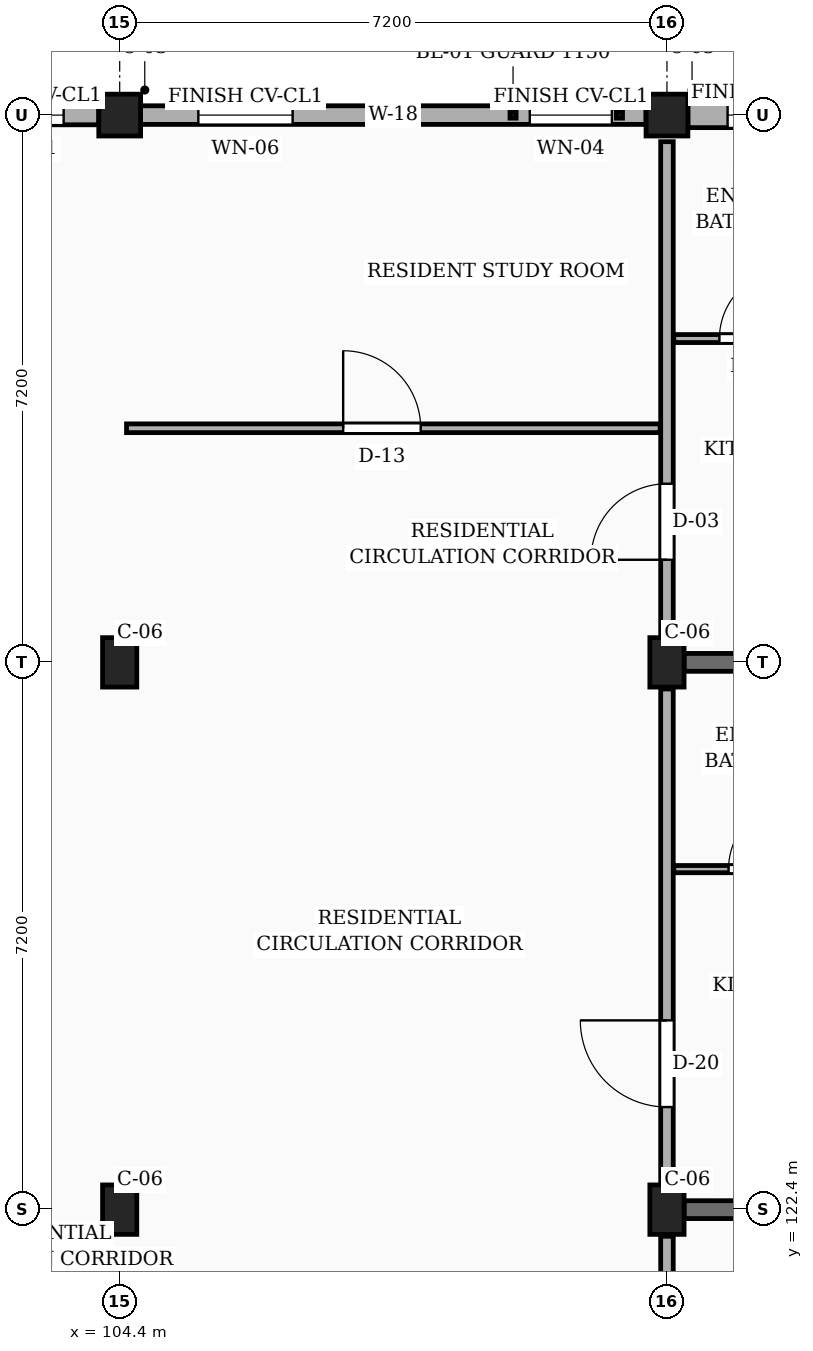
"""IFC4 building model, lengths in metres.
Left out: names, types, materials, properties, quantities, classifications, styles, units other than length and angle.
Written with IfcOpenShell. Run it as: python <this file> out.ifc"""

import sys

from ifc_helpers import new_model, si_unit, direction, frame, frame_2d, origin, origin_2d, place, context, subcontext, project, spatial, rectangle, extrude, element, fill, save


model = new_model("IFC4")
c1 = context("Model", 3, precision=1e-05, world=origin(), true_north=direction((0.0, 1.0)))
c2 = subcontext(c1, "Body", "Model", "MODEL_VIEW")
j1 = project(units=[si_unit("LENGTHUNIT", "METRE"), si_unit("PLANEANGLEUNIT", "RADIAN")], contexts=[c1])
p1 = place(None, origin())
s1 = spatial("IfcSite", under=j1, at=p1, CompositionType="ELEMENT")
p2 = place(p1, origin())
s2 = spatial("IfcBuilding", under=s1, at=p2, CompositionType="ELEMENT")
p3 = place(p2, frame((0.0, 0.0, 13.95)))
s3 = spatial("IfcBuildingStorey", under=s2, at=p3, CompositionType="ELEMENT", Elevation=13.95)
for number, where, z_axis, x_axis in (
    (1, (104.4, 122.4, 0.0), (0.0, 0.0, 1.0), (1.0, 0.0, 0.0)),
    (2, (104.4, 129.6, 0.0), (0.0, 0.0, 1.0), (1.0, 0.0, 0.0)),
):
    element("IfcColumn", number, at=place(p3, frame(where, z_axis=z_axis, x_axis=x_axis)), inside=s3, PredefinedType="COLUMN", context=c2, shape_type="SweptSolid", body=[
        extrude(rectangle(XDim=0.45, YDim=0.65, at=origin_2d()), origin(), (0.0, 0.0, 1.0), 3.15),
    ])
p4 = place(p3, frame((104.4, 136.8, 0.0), z_axis=(0.0, 0.0, 1.0), x_axis=(1.0, 0.0, 0.0)))
e3 = element("IfcColumn", 3, at=p4, inside=s3, PredefinedType="COLUMN", context=c2, shape_type="SweptSolid", body=[
    extrude(rectangle(XDim=0.55, YDim=0.55, at=origin_2d()), origin(), (0.0, 0.0, 1.0), 3.15),
])
for number, where, z_axis, x_axis in (
    (4, (111.6, 122.4, 0.0), (0.0, 0.0, 1.0), (1.0, 0.0, 0.0)),
    (5, (111.6, 129.6, 0.0), (0.0, 0.0, 1.0), (1.0, 0.0, 0.0)),
):
    element("IfcColumn", number, at=place(p3, frame(where, z_axis=z_axis, x_axis=x_axis)), inside=s3, PredefinedType="COLUMN", context=c2, shape_type="SweptSolid", body=[
        extrude(rectangle(XDim=0.45, YDim=0.65, at=origin_2d()), origin(), (0.0, 0.0, 1.0), 3.15),
    ])
p5 = place(p3, frame((111.6, 136.8, 0.0), z_axis=(0.0, 0.0, 1.0), x_axis=(1.0, 0.0, 0.0)))
e6 = element("IfcColumn", 6, at=p5, inside=s3, PredefinedType="COLUMN", context=c2, shape_type="SweptSolid", body=[
    extrude(rectangle(XDim=0.55, YDim=0.55, at=origin_2d()), origin(), (0.0, 0.0, 1.0), 3.15),
])
for number, where, z_axis, x_axis in (
    (7, (111.825, 122.4, 0.0), (0.0, 0.0, 1.0), (1.0, 0.0, 0.0)),
    (8, (111.825, 129.6, 0.0), (0.0, 0.0, 1.0), (1.0, 0.0, 0.0)),
):
    element("IfcWall", number, at=place(p3, frame(where, z_axis=z_axis, x_axis=x_axis)), inside=s3, PredefinedType="SOLIDWALL", context=c2, shape_type="SweptSolid", body=[
        extrude(rectangle(XDim=6.7, YDim=0.235, at=frame_2d((3.35, 0.0))), origin(), (0.0, 0.0, 1.0), 2.19),
    ])
p6 = place(p3, frame((118.525, 136.8, 0.0), z_axis=(0.0, 0.0, 1.0), x_axis=(-1.0, 0.0, 0.0)))
e9 = element("IfcWall", 9, at=p6, inside=s3, PredefinedType="SOLIDWALL", context=c2, shape_type="SweptSolid", body=[
    extrude(rectangle(XDim=6.65, YDim=0.33, at=frame_2d((3.325, 0.0))), origin(), (0.0, 0.0, 1.0), 2.46),
])
p7 = place(p6, frame((1.942, 0.0, 0.78)))
e10 = element("IfcOpeningElement", 10, at=p7, cuts=e9, PredefinedType="OPENING", context=c2, shape_type="SweptSolid", body=[
    extrude(rectangle(XDim=0.92, YDim=1.15, at=frame_2d((0.46, 0.575))), frame((0.0, 0.175, 0.0), z_axis=(0.0, -1.0, 0.0), x_axis=(1.0, 0.0, 0.0)), (0.0, 0.0, 1.0), 0.35),
])
p8 = place(p6, frame((5.048, 0.0, 0.78)))
e11 = element("IfcOpeningElement", 11, at=p8, cuts=e9, PredefinedType="OPENING", context=c2, shape_type="SweptSolid", body=[
    extrude(rectangle(XDim=1.08, YDim=1.15, at=frame_2d((0.54, 0.575))), frame((0.0, 0.175, 0.0), z_axis=(0.0, -1.0, 0.0), x_axis=(1.0, 0.0, 0.0)), (0.0, 0.0, 1.0), 0.35),
])
p9 = place(p3, frame((111.325, 136.8, 0.0), z_axis=(0.0, 0.0, 1.0), x_axis=(-1.0, 0.0, 0.0)))
e12 = element("IfcWall", 12, at=p9, inside=s3, PredefinedType="SOLIDWALL", context=c2, shape_type="SweptSolid", body=[
    extrude(rectangle(XDim=6.65, YDim=0.245, at=frame_2d((3.325, 0.0))), origin(), (0.0, 0.0, 1.0), 2.46),
])
p10 = place(p9, frame((0.45, 0.0, 0.78)))
e13 = element("IfcOpeningElement", 13, at=p10, cuts=e12, PredefinedType="OPENING", context=c2, shape_type="SweptSolid", body=[
    extrude(rectangle(XDim=1.08, YDim=1.15, at=frame_2d((0.54, 0.575))), frame((0.0, 0.133, 0.0), z_axis=(0.0, -1.0, 0.0), x_axis=(1.0, 0.0, 0.0)), (0.0, 0.0, 1.0), 0.265),
])
p11 = place(p9, frame((4.65, 0.0, 0.78)))
e14 = element("IfcOpeningElement", 14, at=p11, cuts=e12, PredefinedType="OPENING", context=c2, shape_type="SweptSolid", body=[
    extrude(rectangle(XDim=1.24, YDim=1.15, at=frame_2d((0.62, 0.575))), frame((0.0, 0.133, 0.0), z_axis=(0.0, -1.0, 0.0), x_axis=(1.0, 0.0, 0.0)), (0.0, 0.0, 1.0), 0.265),
])
p12 = place(p3, frame((104.125, 136.8, 0.0), z_axis=(0.0, 0.0, 1.0), x_axis=(-1.0, 0.0, 0.0)))
e15 = element("IfcWall", 15, at=p12, inside=s3, PredefinedType="SOLIDWALL", context=c2, shape_type="SweptSolid", body=[
    extrude(rectangle(XDim=6.65, YDim=0.255, at=frame_2d((3.325, 0.0))), origin(), (0.0, 0.0, 1.0), 2.46),
])
p13 = place(p12, frame((0.462, 0.0, 0.78)))
e16 = element("IfcOpeningElement", 16, at=p13, cuts=e15, PredefinedType="OPENING", context=c2, shape_type="SweptSolid", body=[
    extrude(rectangle(XDim=1.04, YDim=1.26, at=frame_2d((0.52, 0.63))), frame((0.0, 0.137, 0.0), z_axis=(0.0, -1.0, 0.0), x_axis=(1.0, 0.0, 0.0)), (0.0, 0.0, 1.0), 0.275),
])
p14 = place(p12, frame((3.275, 0.0, 0.78)))
e17 = element("IfcOpeningElement", 17, at=p14, cuts=e15, PredefinedType="OPENING", context=c2, shape_type="SweptSolid", body=[
    extrude(rectangle(XDim=1.4, YDim=1.15, at=frame_2d((0.7, 0.575))), frame((0.0, 0.137, 0.0), z_axis=(0.0, -1.0, 0.0), x_axis=(1.0, 0.0, 0.0)), (0.0, 0.0, 1.0), 0.275),
])
p15 = place(p3, frame((111.6, 115.55, 0.0), z_axis=(0.0, 0.0, 1.0), x_axis=(0.0, 1.0, 0.0)))
e18 = element("IfcWall", 18, at=p15, inside=s3, PredefinedType="PARTITIONING", context=c2, shape_type="SweptSolid", body=[
    extrude(rectangle(XDim=6.5, YDim=0.165, at=frame_2d((3.25, 0.0))), origin(), (0.0, 0.0, 1.0), 2.325),
])
p16 = place(p15, frame((1.1, 0.0, 0.0)))
e19 = element("IfcOpeningElement", 19, at=p16, cuts=e18, PredefinedType="OPENING", context=c2, shape_type="SweptSolid", body=[
    extrude(rectangle(XDim=0.94, YDim=2.12, at=frame_2d((0.47, 1.06))), frame((0.0, 0.093, 0.0), z_axis=(0.0, -1.0, 0.0), x_axis=(1.0, 0.0, 0.0)), (0.0, 0.0, 1.0), 0.185),
])
p17 = place(p3, frame((111.6, 122.75, 0.0), z_axis=(0.0, 0.0, 1.0), x_axis=(0.0, 1.0, 0.0)))
e20 = element("IfcWall", 20, at=p17, inside=s3, PredefinedType="PARTITIONING", context=c2, shape_type="SweptSolid", body=[
    extrude(rectangle(XDim=6.5, YDim=0.165, at=frame_2d((3.25, 0.0))), origin(), (0.0, 0.0, 1.0), 2.325),
])
p18 = place(p17, frame((1.0, 0.0, 0.0)))
e21 = element("IfcOpeningElement", 21, at=p18, cuts=e20, PredefinedType="OPENING", context=c2, shape_type="SweptSolid", body=[
    extrude(rectangle(XDim=1.14, YDim=2.18, at=frame_2d((0.57, 1.09))), frame((0.0, 0.093, 0.0), z_axis=(0.0, -1.0, 0.0), x_axis=(1.0, 0.0, 0.0)), (0.0, 0.0, 1.0), 0.185),
])
p19 = place(p3, frame((111.6, 129.95, 0.0), z_axis=(0.0, 0.0, 1.0), x_axis=(0.0, 1.0, 0.0)))
e22 = element("IfcWall", 22, at=p19, inside=s3, PredefinedType="PARTITIONING", context=c2, shape_type="SweptSolid", body=[
    extrude(rectangle(XDim=6.5, YDim=0.165, at=frame_2d((3.25, 0.0))), origin(), (0.0, 0.0, 1.0), 2.325),
])
p20 = place(p19, frame((1.0, 0.0, 0.0)))
e23 = element("IfcOpeningElement", 23, at=p20, cuts=e22, PredefinedType="OPENING", context=c2, shape_type="SweptSolid", body=[
    extrude(rectangle(XDim=1.0, YDim=2.15, at=frame_2d((0.5, 1.075))), frame((0.0, 0.093, 0.0), z_axis=(0.0, -1.0, 0.0), x_axis=(1.0, 0.0, 0.0)), (0.0, 0.0, 1.0), 0.185),
])
p21 = place(p3, frame((111.69, 126.88, 0.0), z_axis=(0.0, 0.0, 1.0), x_axis=(1.0, 0.0, 0.0)))
e24 = element("IfcWall", 24, at=p21, inside=s3, PredefinedType="PARTITIONING", context=c2, shape_type="SweptSolid", body=[
    extrude(rectangle(XDim=2.34, YDim=0.095, at=frame_2d((1.17, 0.0))), origin(), (0.0, 0.0, 1.0), 2.325),
])
p22 = place(p21, frame((0.72, 0.0, 0.0)))
e25 = element("IfcOpeningElement", 25, at=p22, cuts=e24, PredefinedType="OPENING", context=c2, shape_type="SweptSolid", body=[
    extrude(rectangle(XDim=0.9, YDim=2.05, at=frame_2d((0.45, 1.025))), frame((0.0, 0.058, 0.0), z_axis=(0.0, -1.0, 0.0), x_axis=(1.0, 0.0, 0.0)), (0.0, 0.0, 1.0), 0.115),
])
p23 = place(p3, frame((104.49, 132.68, 0.0), z_axis=(0.0, 0.0, 1.0), x_axis=(1.0, 0.0, 0.0)))
e26 = element("IfcWall", 26, at=p23, inside=s3, PredefinedType="PARTITIONING", context=c2, shape_type="SweptSolid", body=[
    extrude(rectangle(XDim=7.02, YDim=0.115, at=frame_2d((3.51, 0.0))), origin(), (0.0, 0.0, 1.0), 2.325),
])
p24 = place(p23, frame((2.85, 0.0, 0.0)))
e27 = element("IfcOpeningElement", 27, at=p24, cuts=e26, PredefinedType="OPENING", context=c2, shape_type="SweptSolid", body=[
    extrude(rectangle(XDim=1.02, YDim=2.15, at=frame_2d((0.51, 1.075))), frame((0.0, 0.067, 0.0), z_axis=(0.0, -1.0, 0.0), x_axis=(1.0, 0.0, 0.0)), (0.0, 0.0, 1.0), 0.135),
])
p25 = place(p3, frame((111.69, 133.86, 0.0), z_axis=(0.0, 0.0, 1.0), x_axis=(1.0, 0.0, 0.0)))
e28 = element("IfcWall", 28, at=p25, inside=s3, PredefinedType="PARTITIONING", context=c2, shape_type="SweptSolid", body=[
    extrude(rectangle(XDim=2.1, YDim=0.105, at=frame_2d((1.05, 0.0))), origin(), (0.0, 0.0, 1.0), 2.325),
])
p26 = place(p25, frame((0.6, 0.0, 0.0)))
e29 = element("IfcOpeningElement", 29, at=p26, cuts=e28, PredefinedType="OPENING", context=c2, shape_type="SweptSolid", body=[
    extrude(rectangle(XDim=0.9, YDim=2.05, at=frame_2d((0.45, 1.025))), frame((0.0, 0.062, 0.0), z_axis=(0.0, -1.0, 0.0), x_axis=(1.0, 0.0, 0.0)), (0.0, 0.0, 1.0), 0.125),
])
p27 = place(p8, origin())
e30 = element("IfcWindow", 30, at=p27, inside=s3, PartitioningType="SINGLE_PANEL", PredefinedType="WINDOW", context=c2, shape_type="SweptSolid", body=[
    extrude(rectangle(XDim=1.08, YDim=1.15, at=frame_2d((0.54, 0.575))), frame((0.0, 0.03, 0.0), z_axis=(0.0, -1.0, 0.0), x_axis=(1.0, 0.0, 0.0)), (0.0, 0.0, 1.0), 0.06),
])
fill(e11, e30)
p28 = place(p10, origin())
e31 = element("IfcWindow", 31, at=p28, inside=s3, PartitioningType="SINGLE_PANEL", PredefinedType="WINDOW", context=c2, shape_type="SweptSolid", body=[
    extrude(rectangle(XDim=1.08, YDim=1.15, at=frame_2d((0.54, 0.575))), frame((0.0, 0.03, 0.0), z_axis=(0.0, -1.0, 0.0), x_axis=(1.0, 0.0, 0.0)), (0.0, 0.0, 1.0), 0.06),
])
fill(e13, e31)
p29 = place(p11, origin())
e32 = element("IfcWindow", 32, at=p29, inside=s3, PartitioningType="SINGLE_PANEL", PredefinedType="WINDOW", context=c2, shape_type="SweptSolid", body=[
    extrude(rectangle(XDim=1.24, YDim=1.15, at=frame_2d((0.62, 0.575))), frame((0.0, 0.03, 0.0), z_axis=(0.0, -1.0, 0.0), x_axis=(1.0, 0.0, 0.0)), (0.0, 0.0, 1.0), 0.06),
])
fill(e14, e32)
p30 = place(p13, origin())
e33 = element("IfcWindow", 33, at=p30, inside=s3, PartitioningType="SINGLE_PANEL", PredefinedType="WINDOW", context=c2, shape_type="SweptSolid", body=[
    extrude(rectangle(XDim=1.04, YDim=1.26, at=frame_2d((0.52, 0.63))), frame((0.0, 0.03, 0.0), z_axis=(0.0, -1.0, 0.0), x_axis=(1.0, 0.0, 0.0)), (0.0, 0.0, 1.0), 0.06),
])
fill(e16, e33)
p31 = place(p18, origin())
e34 = element("IfcDoor", 34, at=p31, inside=s3, OperationType="SINGLE_SWING_RIGHT", PredefinedType="DOOR", context=c2, shape_type="SweptSolid", body=[
    extrude(rectangle(XDim=1.14, YDim=2.18, at=frame_2d((0.57, 1.09))), frame((0.0, 0.025, 0.0), z_axis=(0.0, -1.0, 0.0), x_axis=(1.0, 0.0, 0.0)), (0.0, 0.0, 1.0), 0.05),
])
fill(e21, e34)
p32 = place(p20, origin())
e35 = element("IfcDoor", 35, at=p32, inside=s3, OperationType="SINGLE_SWING_LEFT", PredefinedType="DOOR", context=c2, shape_type="SweptSolid", body=[
    extrude(rectangle(XDim=1.0, YDim=2.15, at=frame_2d((0.5, 1.075))), frame((0.0, 0.025, 0.0), z_axis=(0.0, -1.0, 0.0), x_axis=(1.0, 0.0, 0.0)), (0.0, 0.0, 1.0), 0.05),
])
fill(e23, e35)
p33 = place(p22, origin())
e36 = element("IfcDoor", 36, at=p33, inside=s3, OperationType="SINGLE_SWING_RIGHT", PredefinedType="DOOR", context=c2, shape_type="SweptSolid", body=[
    extrude(rectangle(XDim=0.9, YDim=2.05, at=frame_2d((0.45, 1.025))), frame((0.0, 0.025, 0.0), z_axis=(0.0, -1.0, 0.0), x_axis=(1.0, 0.0, 0.0)), (0.0, 0.0, 1.0), 0.05),
])
fill(e25, e36)
p34 = place(p24, origin())
e37 = element("IfcDoor", 37, at=p34, inside=s3, OperationType="SINGLE_SWING_LEFT", PredefinedType="DOOR", context=c2, shape_type="SweptSolid", body=[
    extrude(rectangle(XDim=1.02, YDim=2.15, at=frame_2d((0.51, 1.075))), frame((0.0, 0.025, 0.0), z_axis=(0.0, -1.0, 0.0), x_axis=(1.0, 0.0, 0.0)), (0.0, 0.0, 1.0), 0.05),
])
fill(e27, e37)
p35 = place(p26, origin())
e38 = element("IfcDoor", 38, at=p35, inside=s3, OperationType="SINGLE_SWING_RIGHT", PredefinedType="DOOR", context=c2, shape_type="SweptSolid", body=[
    extrude(rectangle(XDim=0.9, YDim=2.05, at=frame_2d((0.45, 1.025))), frame((0.0, 0.025, 0.0), z_axis=(0.0, -1.0, 0.0), x_axis=(1.0, 0.0, 0.0)), (0.0, 0.0, 1.0), 0.05),
])
fill(e29, e38)
save(model, sys.argv[1])
